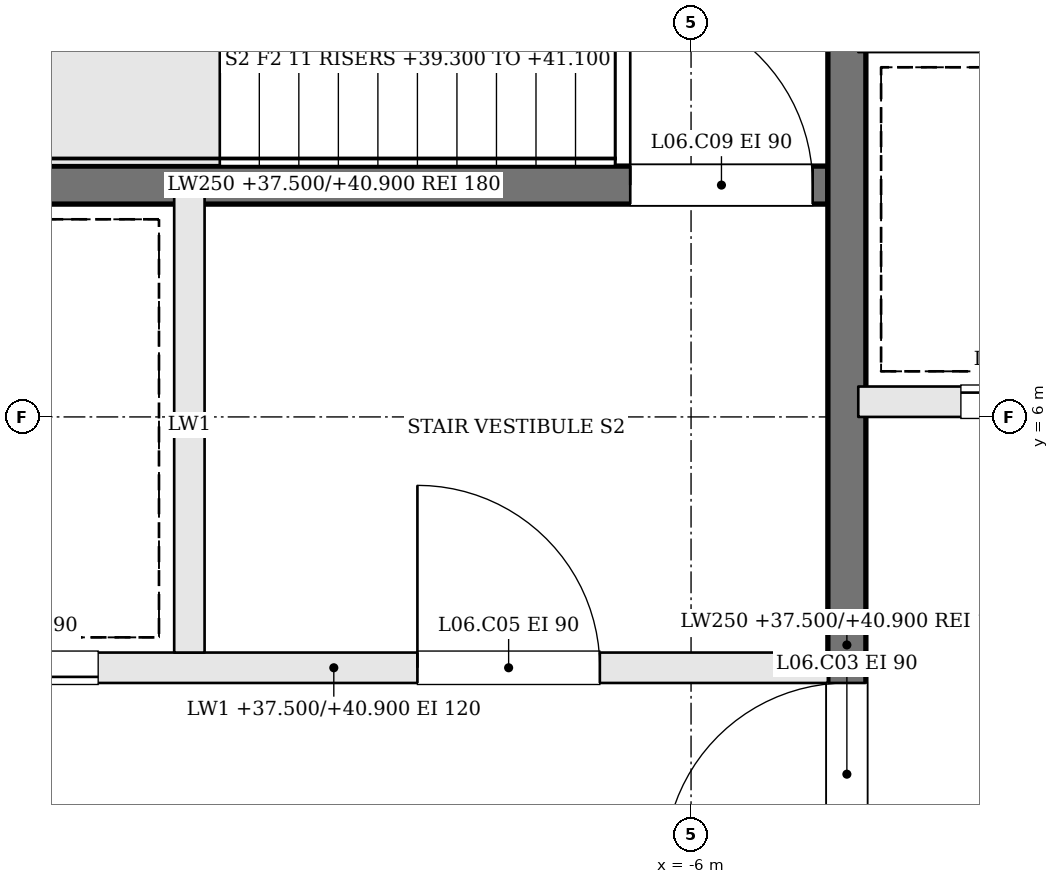
"""IFC4 building model, lengths in metres.
Left out: names, types, materials, properties, quantities, classifications, styles, units other than length and angle.
Written with IfcOpenShell. Run it as: python <this file> out.ifc"""

import sys

from ifc_helpers import new_model, si_unit, direction, frame, frame_2d, origin, place, context, subcontext, project, spatial, rectangle, extrude, element, fill, save


model = new_model("IFC4")
c1 = context("Model", 3, precision=1e-05, world=origin(), true_north=direction((0.0, 1.0)))
c2 = subcontext(c1, "Body", "Model", "MODEL_VIEW")
j1 = project(units=[si_unit("LENGTHUNIT", "METRE"), si_unit("PLANEANGLEUNIT", "RADIAN")], contexts=[c1])
p1 = place(None, origin())
s1 = spatial("IfcSite", under=j1, at=p1, CompositionType="ELEMENT")
p2 = place(p1, origin())
s2 = spatial("IfcBuilding", under=s1, at=p2, CompositionType="ELEMENT")
p3 = place(p2, frame((0.0, 0.0, 37.5)))
s3 = spatial("IfcBuildingStorey", under=s2, at=p3, CompositionType="ELEMENT", Elevation=37.5)
p4 = place(p3, frame((-11.6, 4.35, 0.0), z_axis=(0.0, 0.0, 1.0), x_axis=(1.0, 0.0, 0.0)))
e1 = element("IfcWall", 1, at=p4, inside=s3, PredefinedType="SOLIDWALL", context=c2, shape_type="SweptSolid", body=[
    extrude(rectangle(XDim=6.5, YDim=0.2, at=frame_2d((3.25, 0.0))), origin(), (0.0, 0.0, 1.0), 3.4),
])
p5 = place(p4, frame((3.8, 0.0, 0.0)))
e2 = element("IfcOpeningElement", 2, at=p5, cuts=e1, PredefinedType="OPENING", context=c2, shape_type="SweptSolid", body=[
    extrude(rectangle(XDim=1.2, YDim=2.1, at=frame_2d((0.6, 1.05))), frame((0.0, 0.11, 0.0), z_axis=(0.0, -1.0, 0.0), x_axis=(1.0, 0.0, 0.0)), (0.0, 0.0, 1.0), 0.22),
])
p6 = place(p4, frame((0.5, 0.0, 0.0)))
e3 = element("IfcOpeningElement", 3, at=p6, cuts=e1, PredefinedType="OPENING", context=c2, shape_type="SweptSolid", body=[
    extrude(rectangle(XDim=1.2, YDim=2.1, at=frame_2d((0.6, 1.05))), frame((0.0, 0.11, 0.0), z_axis=(0.0, -1.0, 0.0), x_axis=(1.0, 0.0, 0.0)), (0.0, 0.0, 1.0), 0.22),
])
p7 = place(p3, frame((-11.6, 7.525, 0.0), z_axis=(0.0, 0.0, 1.0), x_axis=(1.0, 0.0, 0.0)))
e4 = element("IfcWall", 4, at=p7, inside=s3, PredefinedType="SOLIDWALL", context=c2, shape_type="SweptSolid", body=[
    extrude(rectangle(XDim=6.5, YDim=0.25, at=frame_2d((3.25, 0.0))), origin(), (0.0, 0.0, 1.0), 3.4),
])
p8 = place(p7, frame((5.2, 0.0, 0.0)))
e5 = element("IfcOpeningElement", 5, at=p8, cuts=e4, PredefinedType="OPENING", context=c2, shape_type="SweptSolid", body=[
    extrude(rectangle(XDim=1.2, YDim=2.1, at=frame_2d((0.6, 1.05))), frame((0.0, 0.135, 0.0), z_axis=(0.0, -1.0, 0.0), x_axis=(1.0, 0.0, 0.0)), (0.0, 0.0, 1.0), 0.27),
])
p9 = place(p3, frame((-9.3, 4.45, 0.0), z_axis=(0.0, 0.0, 1.0), x_axis=(0.0, 1.0, 0.0)))
e6 = element("IfcWall", 6, at=p9, inside=s3, PredefinedType="SOLIDWALL", context=c2, shape_type="SweptSolid", body=[
    extrude(rectangle(XDim=3.0, YDim=0.2, at=frame_2d((1.5, 0.0))), origin(), (0.0, 0.0, 1.0), 3.4),
])
p10 = place(p3, frame((-4.975, -1.6, 0.0), z_axis=(0.0, 0.0, 1.0), x_axis=(0.0, 1.0, 0.0)))
e7 = element("IfcWall", 7, at=p10, inside=s3, PredefinedType="SOLIDWALL", context=c2, shape_type="SweptSolid", body=[
    extrude(rectangle(XDim=12.2, YDim=0.25, at=frame_2d((6.1, 0.0))), origin(), (0.0, 0.0, 1.0), 3.4),
])
p11 = place(p10, frame((4.65, 0.0, 0.0)))
e8 = element("IfcOpeningElement", 8, at=p11, cuts=e7, PredefinedType="OPENING", context=c2, shape_type="SweptSolid", body=[
    extrude(rectangle(XDim=1.2, YDim=2.1, at=frame_2d((0.6, 1.05))), frame((0.0, 0.135, 0.0), z_axis=(0.0, -1.0, 0.0), x_axis=(1.0, 0.0, 0.0)), (0.0, 0.0, 1.0), 0.27),
])
p12 = place(p3, frame((-4.9, 6.1, 0.0), z_axis=(0.0, 0.0, 1.0), x_axis=(1.0, 0.0, 0.0)))
e9 = element("IfcWall", 9, at=p12, inside=s3, PredefinedType="SOLIDWALL", context=c2, shape_type="SweptSolid", body=[
    extrude(rectangle(XDim=9.8, YDim=0.2, at=frame_2d((4.9, 0.0))), origin(), (0.0, 0.0, 1.0), 3.4),
])
p13 = place(p12, frame((0.675, 0.0, 0.0)))
e10 = element("IfcOpeningElement", 10, at=p13, cuts=e9, PredefinedType="OPENING", context=c2, shape_type="SweptSolid", body=[
    extrude(rectangle(XDim=1.1, YDim=2.1, at=frame_2d((0.55, 1.05))), frame((0.0, 0.11, 0.0), z_axis=(0.0, -1.0, 0.0), x_axis=(1.0, 0.0, 0.0)), (0.0, 0.0, 1.0), 0.22),
])
p14 = place(p12, frame((3.125, 0.0, 0.0)))
e11 = element("IfcOpeningElement", 11, at=p14, cuts=e9, PredefinedType="OPENING", context=c2, shape_type="SweptSolid", body=[
    extrude(rectangle(XDim=1.1, YDim=2.1, at=frame_2d((0.55, 1.05))), frame((0.0, 0.11, 0.0), z_axis=(0.0, -1.0, 0.0), x_axis=(1.0, 0.0, 0.0)), (0.0, 0.0, 1.0), 0.22),
])
p15 = place(p12, frame((5.575, 0.0, 0.0)))
e12 = element("IfcOpeningElement", 12, at=p15, cuts=e9, PredefinedType="OPENING", context=c2, shape_type="SweptSolid", body=[
    extrude(rectangle(XDim=1.1, YDim=2.1, at=frame_2d((0.55, 1.05))), frame((0.0, 0.11, 0.0), z_axis=(0.0, -1.0, 0.0), x_axis=(1.0, 0.0, 0.0)), (0.0, 0.0, 1.0), 0.22),
])
p16 = place(p12, frame((8.025, 0.0, 0.0)))
e13 = element("IfcOpeningElement", 13, at=p16, cuts=e9, PredefinedType="OPENING", context=c2, shape_type="SweptSolid", body=[
    extrude(rectangle(XDim=1.1, YDim=2.1, at=frame_2d((0.55, 1.05))), frame((0.0, 0.11, 0.0), z_axis=(0.0, -1.0, 0.0), x_axis=(1.0, 0.0, 0.0)), (0.0, 0.0, 1.0), 0.22),
])
p17 = place(p11, origin())
e14 = element("IfcDoor", 14, at=p17, inside=s3, OperationType="SINGLE_SWING_LEFT", PredefinedType="DOOR", context=c2, shape_type="SweptSolid", body=[
    extrude(rectangle(XDim=1.2, YDim=2.1, at=frame_2d((0.6, 1.05))), frame((0.0, 0.025, 0.0), z_axis=(0.0, -1.0, 0.0), x_axis=(1.0, 0.0, 0.0)), (0.0, 0.0, 1.0), 0.05),
])
fill(e8, e14)
p18 = place(p5, origin())
e15 = element("IfcDoor", 15, at=p18, inside=s3, OperationType="SINGLE_SWING_LEFT", PredefinedType="DOOR", context=c2, shape_type="SweptSolid", body=[
    extrude(rectangle(XDim=1.2, YDim=2.1, at=frame_2d((0.6, 1.05))), frame((0.0, 0.025, 0.0), z_axis=(0.0, -1.0, 0.0), x_axis=(1.0, 0.0, 0.0)), (0.0, 0.0, 1.0), 0.05),
])
fill(e2, e15)
p19 = place(p8, origin())
e16 = element("IfcDoor", 16, at=p19, inside=s3, OperationType="SINGLE_SWING_LEFT", PredefinedType="DOOR", context=c2, shape_type="SweptSolid", body=[
    extrude(rectangle(XDim=1.2, YDim=2.1, at=frame_2d((0.6, 1.05))), frame((0.0, 0.025, 0.0), z_axis=(0.0, -1.0, 0.0), x_axis=(1.0, 0.0, 0.0)), (0.0, 0.0, 1.0), 0.05),
])
fill(e5, e16)
p20 = place(p6, origin())
e17 = element("IfcDoor", 17, at=p20, inside=s3, OperationType="SLIDING_TO_RIGHT", PredefinedType="DOOR", context=c2, shape_type="SweptSolid", body=[
    extrude(rectangle(XDim=1.2, YDim=2.1, at=frame_2d((0.6, 1.05))), frame((0.0, 0.025, 0.0), z_axis=(0.0, -1.0, 0.0), x_axis=(1.0, 0.0, 0.0)), (0.0, 0.0, 1.0), 0.05),
])
fill(e3, e17)
p21 = place(p13, origin())
e18 = element("IfcDoor", 18, at=p21, inside=s3, OperationType="SLIDING_TO_RIGHT", PredefinedType="DOOR", context=c2, shape_type="SweptSolid", body=[
    extrude(rectangle(XDim=1.1, YDim=2.1, at=frame_2d((0.55, 1.05))), frame((0.0, 0.025, 0.0), z_axis=(0.0, -1.0, 0.0), x_axis=(1.0, 0.0, 0.0)), (0.0, 0.0, 1.0), 0.05),
])
fill(e10, e18)
save(model, sys.argv[1])
